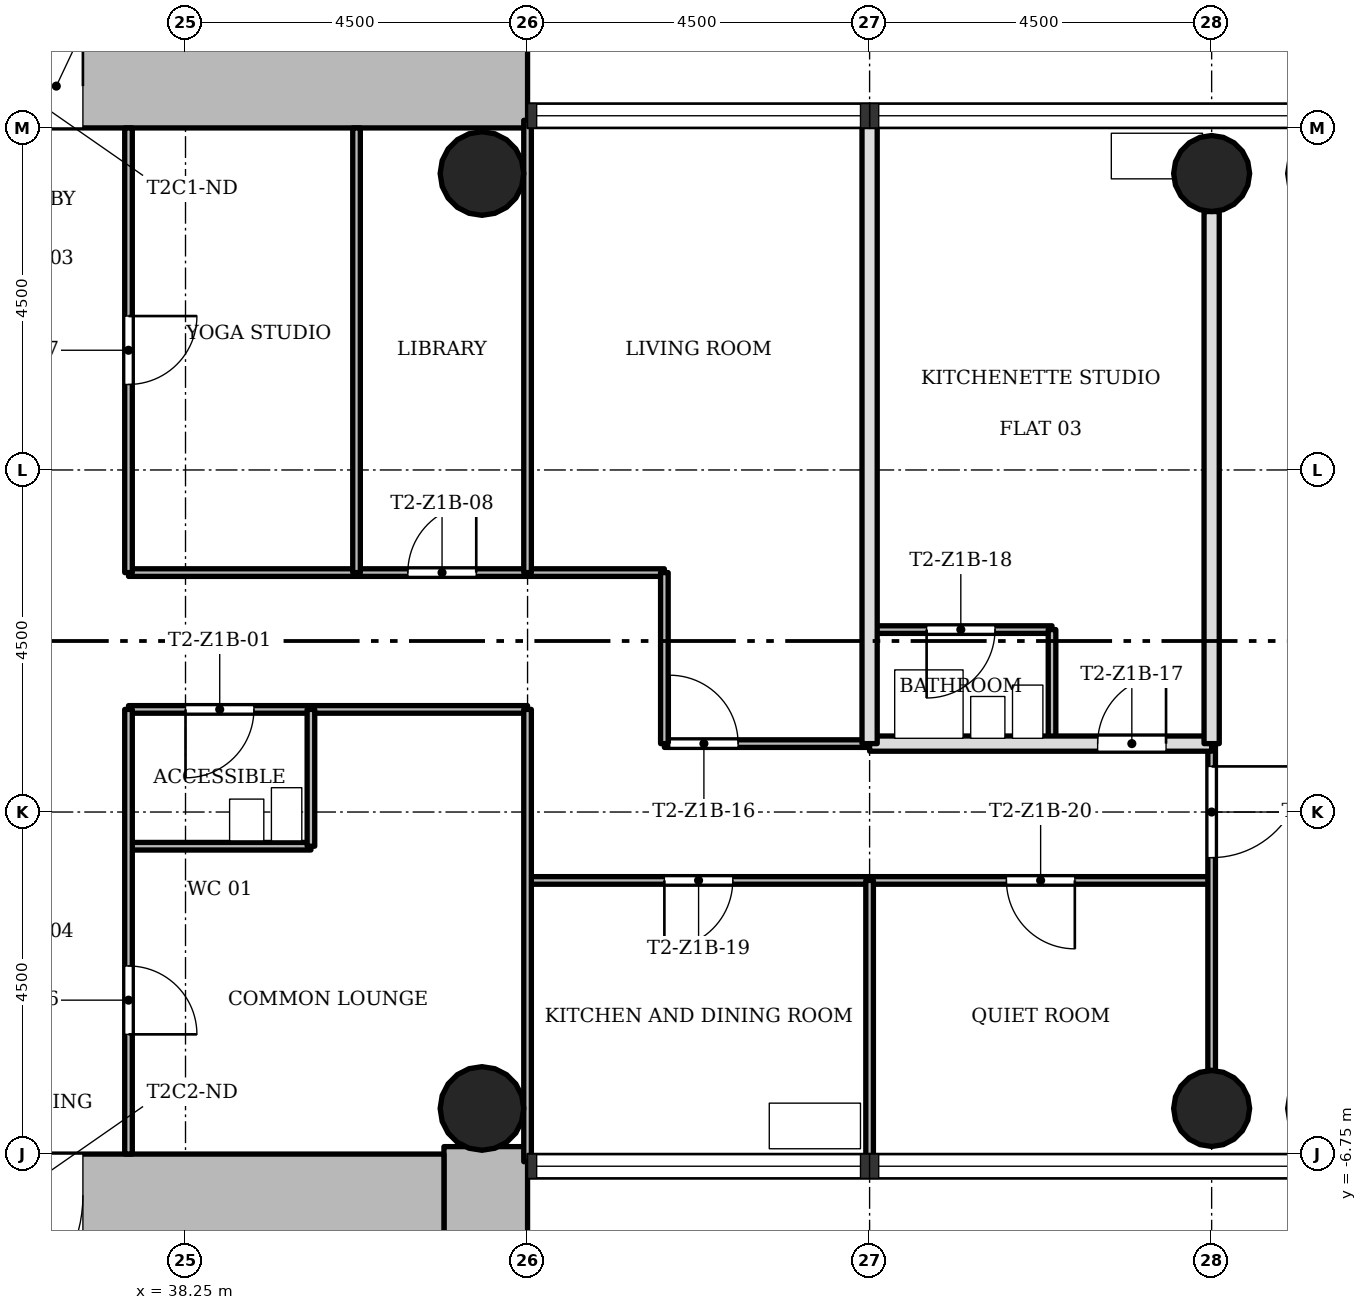
"""IFC4 building model, lengths in metres.
Left out: names, types, materials, properties, quantities, classifications, styles, units other than length and angle.
Written with IfcOpenShell. Run it as: python <this file> out.ifc"""

import sys

from ifc_helpers import new_model, si_unit, direction, frame, frame_2d, origin, origin_2d, place, context, subcontext, project, spatial, rectangle, hollow_circle, extrude, element, fill, save


model = new_model("IFC4")
c1 = context("Model", 3, precision=1e-05, world=origin(), true_north=direction((0.0, 1.0)))
c2 = subcontext(c1, "Body", "Model", "MODEL_VIEW")
j1 = project(units=[si_unit("LENGTHUNIT", "METRE"), si_unit("PLANEANGLEUNIT", "RADIAN")], contexts=[c1])
p1 = place(None, origin())
s1 = spatial("IfcSite", under=j1, at=p1, CompositionType="ELEMENT")
p2 = place(p1, origin())
s2 = spatial("IfcBuilding", under=s1, at=p2, CompositionType="ELEMENT")
p3 = place(p2, frame((0.0, 0.0, 34.7)))
s3 = spatial("IfcBuildingStorey", under=s2, at=p3, CompositionType="ELEMENT", Elevation=34.7)
p4 = place(p3, frame((30.35, 7.3, 0.0), z_axis=(0.0, 0.0, 1.0), x_axis=(1.0, 0.0, 0.0)))
e1 = element("IfcWall", 1, at=p4, inside=s3, PredefinedType="SHEAR", context=c2, shape_type="SweptSolid", body=[
    extrude(rectangle(XDim=12.4, YDim=1.1, at=frame_2d((6.2, 0.0))), origin(), (0.0, 0.0, 1.0), 3.4),
])
p5 = place(p4, frame((4.75, 0.0, 0.0)))
e2 = element("IfcOpeningElement", 2, at=p5, cuts=e1, PredefinedType="OPENING", context=c2, shape_type="SweptSolid", body=[
    extrude(rectangle(XDim=1.8, YDim=2.1, at=frame_2d((0.9, 1.05))), frame((0.0, 0.56, 0.0), z_axis=(0.0, -1.0, 0.0), x_axis=(1.0, 0.0, 0.0)), (0.0, 0.0, 1.0), 1.12),
])
p6 = place(p3, frame((42.2, -15.248, 0.0), z_axis=(0.0, 0.0, 1.0), x_axis=(0.0, 1.0, 0.0)))
e3 = element("IfcWall", 3, at=p6, inside=s3, PredefinedType="SHEAR", context=c2, shape_type="SweptSolid", body=[
    extrude(rectangle(XDim=8.596, YDim=1.1, at=frame_2d((4.298, 0.0))), origin(), (0.0, 0.0, 1.0), 3.4),
])
p7 = place(p3, frame((41.65, -7.3, 0.0), z_axis=(0.0, 0.0, 1.0), x_axis=(-1.0, 0.0, 0.0)))
e4 = element("IfcWall", 4, at=p7, inside=s3, PredefinedType="SHEAR", context=c2, shape_type="SweptSolid", body=[
    extrude(rectangle(XDim=12.4, YDim=1.1, at=frame_2d((6.2, 0.0))), origin(), (0.0, 0.0, 1.0), 3.4),
])
p8 = place(p7, frame((4.75, 0.0, 0.0)))
e5 = element("IfcOpeningElement", 5, at=p8, cuts=e4, PredefinedType="OPENING", context=c2, shape_type="SweptSolid", body=[
    extrude(rectangle(XDim=1.8, YDim=2.1, at=frame_2d((0.9, 1.05))), frame((0.0, 0.56, 0.0), z_axis=(0.0, -1.0, 0.0), x_axis=(1.0, 0.0, 0.0)), (0.0, 0.0, 1.0), 1.12),
])
for number, where, z_axis, x_axis in (
    (6, (51.75, -6.15, 0.0), (0.0, 0.0, 1.0), (1.0, 0.0, 0.0)),
    (7, (51.75, 6.15, 0.0), (0.0, 0.0, 1.0), (1.0, 0.0, 0.0)),
):
    element("IfcColumn", number, at=place(p3, frame(where, z_axis=z_axis, x_axis=x_axis)), inside=s3, PredefinedType="COLUMN", context=c2, shape_type="SweptSolid", body=[
        extrude(hollow_circle(Radius=0.5, WallThickness=0.036, at=origin_2d()), origin(), (0.0, 0.0, 1.0), 3.4),
    ])
for number, where, z_axis, x_axis in (
    (8, (42.15, -6.15, 0.0), (0.0, 0.0, 1.0), (1.0, 0.0, 0.0)),
    (9, (42.15, 6.15, 0.0), (0.0, 0.0, 1.0), (1.0, 0.0, 0.0)),
):
    element("IfcColumn", number, at=place(p3, frame(where, z_axis=z_axis, x_axis=x_axis)), inside=s3, PredefinedType="COLUMN", context=c2, shape_type="SweptSolid", body=[
        extrude(hollow_circle(Radius=0.55, WallThickness=0.04, at=origin_2d()), origin(), (0.0, 0.0, 1.0), 3.4),
    ])
p9 = place(p3, frame((51.75, -3.15, 0.0), z_axis=(0.0, 0.0, 1.0), x_axis=(-1.0, 0.0, 0.0)))
e10 = element("IfcWall", 10, at=p9, inside=s3, PredefinedType="PARTITIONING", context=c2, shape_type="SweptSolid", body=[
    extrude(rectangle(XDim=9.0, YDim=0.1, at=frame_2d((4.5, 0.0))), origin(), (0.0, 0.0, 1.0), 3.0),
])
p10 = place(p9, frame((6.3, 0.0, 0.0)))
e11 = element("IfcOpeningElement", 11, at=p10, cuts=e10, PredefinedType="OPENING", context=c2, shape_type="SweptSolid", body=[
    extrude(rectangle(XDim=0.9, YDim=2.1, at=frame_2d((0.45, 1.05))), frame((0.0, 0.06, 0.0), z_axis=(0.0, -1.0, 0.0), x_axis=(1.0, 0.0, 0.0)), (0.0, 0.0, 1.0), 0.12),
])
p11 = place(p9, frame((1.8, 0.0, 0.0)))
e12 = element("IfcOpeningElement", 12, at=p11, cuts=e10, PredefinedType="OPENING", context=c2, shape_type="SweptSolid", body=[
    extrude(rectangle(XDim=0.9, YDim=2.1, at=frame_2d((0.45, 1.05))), frame((0.0, 0.06, 0.0), z_axis=(0.0, -1.0, 0.0), x_axis=(1.0, 0.0, 0.0)), (0.0, 0.0, 1.0), 0.12),
])
p12 = place(p3, frame((39.9, -2.7, 0.0), z_axis=(0.0, 0.0, 1.0), x_axis=(-1.0, 0.0, 0.0)))
e13 = element("IfcWall", 13, at=p12, inside=s3, PredefinedType="PARTITIONING", context=c2, shape_type="SweptSolid", body=[
    extrude(rectangle(XDim=2.4, YDim=0.1, at=frame_2d((1.2, 0.0))), origin(), (0.0, 0.0, 1.0), 3.0),
])
p13 = place(p3, frame((47.25, -1.35, 0.0), z_axis=(0.0, 0.0, 1.0), x_axis=(-1.0, 0.0, 0.0)))
e14 = element("IfcWall", 14, at=p13, inside=s3, PredefinedType="PARTITIONING", context=c2, shape_type="SweptSolid", body=[
    extrude(rectangle(XDim=2.7, YDim=0.1, at=frame_2d((1.35, 0.0))), origin(), (0.0, 0.0, 1.0), 3.0),
])
p14 = place(p13, frame((1.73, 0.0, 0.0)))
e15 = element("IfcOpeningElement", 15, at=p14, cuts=e14, PredefinedType="OPENING", context=c2, shape_type="SweptSolid", body=[
    extrude(rectangle(XDim=0.9, YDim=2.1, at=frame_2d((0.45, 1.05))), frame((0.0, 0.06, 0.0), z_axis=(0.0, -1.0, 0.0), x_axis=(1.0, 0.0, 0.0)), (0.0, 0.0, 1.0), 0.12),
])
p15 = place(p3, frame((51.75, -1.35, 0.0), z_axis=(0.0, 0.0, 1.0), x_axis=(-1.0, 0.0, 0.0)))
e16 = element("IfcWall", 16, at=p15, inside=s3, PredefinedType="SOLIDWALL", context=c2, shape_type="SweptSolid", body=[
    extrude(rectangle(XDim=4.5, YDim=0.2, at=frame_2d((2.25, 0.0))), origin(), (0.0, 0.0, 1.0), 3.0),
])
p16 = place(p15, frame((0.6, 0.0, 0.0)))
e17 = element("IfcOpeningElement", 17, at=p16, cuts=e16, PredefinedType="OPENING", context=c2, shape_type="SweptSolid", body=[
    extrude(rectangle(XDim=0.9, YDim=2.1, at=frame_2d((0.45, 1.05))), frame((0.0, 0.11, 0.0), z_axis=(0.0, -1.0, 0.0), x_axis=(1.0, 0.0, 0.0)), (0.0, 0.0, 1.0), 0.22),
])
p17 = place(p3, frame((42.75, -0.9, 0.0), z_axis=(0.0, 0.0, 1.0), x_axis=(-1.0, 0.0, 0.0)))
e18 = element("IfcWall", 18, at=p17, inside=s3, PredefinedType="PARTITIONING", context=c2, shape_type="SweptSolid", body=[
    extrude(rectangle(XDim=5.25, YDim=0.1, at=frame_2d((2.625, 0.0))), origin(), (0.0, 0.0, 1.0), 3.0),
])
p18 = place(p17, frame((3.6, 0.0, 0.0)))
e19 = element("IfcOpeningElement", 19, at=p18, cuts=e18, PredefinedType="OPENING", context=c2, shape_type="SweptSolid", body=[
    extrude(rectangle(XDim=0.9, YDim=2.1, at=frame_2d((0.45, 1.05))), frame((0.0, 0.06, 0.0), z_axis=(0.0, -1.0, 0.0), x_axis=(1.0, 0.0, 0.0)), (0.0, 0.0, 1.0), 0.12),
])
p19 = place(p3, frame((49.65, 0.15, 0.0), z_axis=(0.0, 0.0, 1.0), x_axis=(-1.0, 0.0, 0.0)))
e20 = element("IfcWall", 20, at=p19, inside=s3, PredefinedType="PARTITIONING", context=c2, shape_type="SweptSolid", body=[
    extrude(rectangle(XDim=2.4, YDim=0.1, at=frame_2d((1.2, 0.0))), origin(), (0.0, 0.0, 1.0), 3.0),
])
p20 = place(p19, frame((0.75, 0.0, 0.0)))
e21 = element("IfcOpeningElement", 21, at=p20, cuts=e20, PredefinedType="OPENING", context=c2, shape_type="SweptSolid", body=[
    extrude(rectangle(XDim=0.9, YDim=2.1, at=frame_2d((0.45, 1.05))), frame((0.0, 0.06, 0.0), z_axis=(0.0, -1.0, 0.0), x_axis=(1.0, 0.0, 0.0)), (0.0, 0.0, 1.0), 0.12),
])
p21 = place(p3, frame((44.55, 0.9, 0.0), z_axis=(0.0, 0.0, 1.0), x_axis=(-1.0, 0.0, 0.0)))
e22 = element("IfcWall", 22, at=p21, inside=s3, PredefinedType="PARTITIONING", context=c2, shape_type="SweptSolid", body=[
    extrude(rectangle(XDim=7.05, YDim=0.1, at=frame_2d((3.525, 0.0))), origin(), (0.0, 0.0, 1.0), 3.0),
])
p22 = place(p21, frame((2.475, 0.0, 0.0)))
e23 = element("IfcOpeningElement", 23, at=p22, cuts=e22, PredefinedType="OPENING", context=c2, shape_type="SweptSolid", body=[
    extrude(rectangle(XDim=0.9, YDim=2.1, at=frame_2d((0.45, 1.05))), frame((0.0, 0.06, 0.0), z_axis=(0.0, -1.0, 0.0), x_axis=(1.0, 0.0, 0.0)), (0.0, 0.0, 1.0), 0.12),
])
p23 = place(p3, frame((51.75, -5.65, 0.0), z_axis=(0.0, 0.0, 1.0), x_axis=(0.0, 1.0, 0.0)))
e24 = element("IfcWall", 24, at=p23, inside=s3, PredefinedType="PARTITIONING", context=c2, shape_type="SweptSolid", body=[
    extrude(rectangle(XDim=4.3, YDim=0.1, at=frame_2d((2.15, 0.0))), origin(), (0.0, 0.0, 1.0), 3.0),
])
p24 = place(p23, frame((2.8, 0.0, 0.0)))
e25 = element("IfcOpeningElement", 25, at=p24, cuts=e24, PredefinedType="OPENING", context=c2, shape_type="SweptSolid", body=[
    extrude(rectangle(XDim=1.2, YDim=2.1, at=frame_2d((0.6, 1.05))), frame((0.0, 0.06, 0.0), z_axis=(0.0, -1.0, 0.0), x_axis=(1.0, 0.0, 0.0)), (0.0, 0.0, 1.0), 0.12),
])
p25 = place(p3, frame((51.75, -1.35, 0.0), z_axis=(0.0, 0.0, 1.0), x_axis=(0.0, 1.0, 0.0)))
e26 = element("IfcWall", 26, at=p25, inside=s3, PredefinedType="SOLIDWALL", context=c2, shape_type="SweptSolid", body=[
    extrude(rectangle(XDim=7.0, YDim=0.2, at=frame_2d((3.5, 0.0))), origin(), (0.0, 0.0, 1.0), 3.0),
])
p26 = place(p3, frame((49.65, -1.35, 0.0), z_axis=(0.0, 0.0, 1.0), x_axis=(0.0, 1.0, 0.0)))
e27 = element("IfcWall", 27, at=p26, inside=s3, PredefinedType="PARTITIONING", context=c2, shape_type="SweptSolid", body=[
    extrude(rectangle(XDim=1.5, YDim=0.1, at=frame_2d((0.75, 0.0))), origin(), (0.0, 0.0, 1.0), 3.0),
])
p27 = place(p3, frame((47.25, -6.85, 0.0), z_axis=(0.0, 0.0, 1.0), x_axis=(0.0, 1.0, 0.0)))
e28 = element("IfcWall", 28, at=p27, inside=s3, PredefinedType="PARTITIONING", context=c2, shape_type="SweptSolid", body=[
    extrude(rectangle(XDim=3.7, YDim=0.1, at=frame_2d((1.85, 0.0))), origin(), (0.0, 0.0, 1.0), 3.0),
])
p28 = place(p3, frame((47.25, -1.35, 0.0), z_axis=(0.0, 0.0, 1.0), x_axis=(0.0, 1.0, 0.0)))
e29 = element("IfcWall", 29, at=p28, inside=s3, PredefinedType="SOLIDWALL", context=c2, shape_type="SweptSolid", body=[
    extrude(rectangle(XDim=8.2, YDim=0.2, at=frame_2d((4.1, 0.0))), origin(), (0.0, 0.0, 1.0), 3.0),
])
p29 = place(p3, frame((44.55, -1.35, 0.0), z_axis=(0.0, 0.0, 1.0), x_axis=(0.0, 1.0, 0.0)))
e30 = element("IfcWall", 30, at=p29, inside=s3, PredefinedType="PARTITIONING", context=c2, shape_type="SweptSolid", body=[
    extrude(rectangle(XDim=2.25, YDim=0.1, at=frame_2d((1.125, 0.0))), origin(), (0.0, 0.0, 1.0), 3.0),
])
for number, where, z_axis, x_axis in (
    (31, (42.75, -6.85, 0.0), (0.0, 0.0, 1.0), (0.0, 1.0, 0.0)),
    (32, (42.75, 0.9, 0.0), (0.0, 0.0, 1.0), (0.0, 1.0, 0.0)),
):
    element("IfcWall", number, at=place(p3, frame(where, z_axis=z_axis, x_axis=x_axis)), inside=s3, PredefinedType="PARTITIONING", context=c2, shape_type="SweptSolid", body=[
        extrude(rectangle(XDim=5.95, YDim=0.1, at=frame_2d((2.975, 0.0))), origin(), (0.0, 0.0, 1.0), 3.0),
    ])
p30 = place(p3, frame((40.5, 0.9, 0.0), z_axis=(0.0, 0.0, 1.0), x_axis=(0.0, 1.0, 0.0)))
e33 = element("IfcWall", 33, at=p30, inside=s3, PredefinedType="PARTITIONING", context=c2, shape_type="SweptSolid", body=[
    extrude(rectangle(XDim=5.85, YDim=0.1, at=frame_2d((2.925, 0.0))), origin(), (0.0, 0.0, 1.0), 3.0),
])
p31 = place(p3, frame((39.9, -2.7, 0.0), z_axis=(0.0, 0.0, 1.0), x_axis=(0.0, 1.0, 0.0)))
e34 = element("IfcWall", 34, at=p31, inside=s3, PredefinedType="PARTITIONING", context=c2, shape_type="SweptSolid", body=[
    extrude(rectangle(XDim=1.8, YDim=0.1, at=frame_2d((0.9, 0.0))), origin(), (0.0, 0.0, 1.0), 3.0),
])
p32 = place(p3, frame((37.5, -6.75, 0.0), z_axis=(0.0, 0.0, 1.0), x_axis=(0.0, 1.0, 0.0)))
e35 = element("IfcWall", 35, at=p32, inside=s3, PredefinedType="PARTITIONING", context=c2, shape_type="SweptSolid", body=[
    extrude(rectangle(XDim=5.85, YDim=0.1, at=frame_2d((2.925, 0.0))), origin(), (0.0, 0.0, 1.0), 3.0),
])
p33 = place(p32, frame((1.575, 0.0, 0.0)))
e36 = element("IfcOpeningElement", 36, at=p33, cuts=e35, PredefinedType="OPENING", context=c2, shape_type="SweptSolid", body=[
    extrude(rectangle(XDim=0.9, YDim=2.1, at=frame_2d((0.45, 1.05))), frame((0.0, 0.06, 0.0), z_axis=(0.0, -1.0, 0.0), x_axis=(1.0, 0.0, 0.0)), (0.0, 0.0, 1.0), 0.12),
])
p34 = place(p3, frame((37.5, 0.9, 0.0), z_axis=(0.0, 0.0, 1.0), x_axis=(0.0, 1.0, 0.0)))
e37 = element("IfcWall", 37, at=p34, inside=s3, PredefinedType="PARTITIONING", context=c2, shape_type="SweptSolid", body=[
    extrude(rectangle(XDim=5.85, YDim=0.1, at=frame_2d((2.925, 0.0))), origin(), (0.0, 0.0, 1.0), 3.0),
])
p35 = place(p34, frame((2.475, 0.0, 0.0)))
e38 = element("IfcOpeningElement", 38, at=p35, cuts=e37, PredefinedType="OPENING", context=c2, shape_type="SweptSolid", body=[
    extrude(rectangle(XDim=0.9, YDim=2.1, at=frame_2d((0.45, 1.05))), frame((0.0, 0.06, 0.0), z_axis=(0.0, -1.0, 0.0), x_axis=(1.0, 0.0, 0.0)), (0.0, 0.0, 1.0), 0.12),
])
p36 = place(p18, origin())
e39 = element("IfcDoor", 39, at=p36, inside=s3, OperationType="SINGLE_SWING_LEFT", PredefinedType="DOOR", context=c2, shape_type="SweptSolid", body=[
    extrude(rectangle(XDim=0.9, YDim=2.1, at=frame_2d((0.45, 1.05))), frame((0.0, 0.025, 0.0), z_axis=(0.0, -1.0, 0.0), x_axis=(1.0, 0.0, 0.0)), (0.0, 0.0, 1.0), 0.05),
])
fill(e19, e39)
p37 = place(p33, origin())
e40 = element("IfcDoor", 40, at=p37, inside=s3, OperationType="SINGLE_SWING_LEFT", PredefinedType="DOOR", context=c2, shape_type="SweptSolid", body=[
    extrude(rectangle(XDim=0.9, YDim=2.1, at=frame_2d((0.45, 1.05))), frame((0.0, 0.025, 0.0), z_axis=(0.0, -1.0, 0.0), x_axis=(1.0, 0.0, 0.0)), (0.0, 0.0, 1.0), 0.05),
])
fill(e36, e40)
p38 = place(p35, origin())
e41 = element("IfcDoor", 41, at=p38, inside=s3, OperationType="SINGLE_SWING_RIGHT", PredefinedType="DOOR", context=c2, shape_type="SweptSolid", body=[
    extrude(rectangle(XDim=0.9, YDim=2.1, at=frame_2d((0.45, 1.05))), frame((0.0, 0.025, 0.0), z_axis=(0.0, -1.0, 0.0), x_axis=(1.0, 0.0, 0.0)), (0.0, 0.0, 1.0), 0.05),
])
fill(e38, e41)
p39 = place(p22, origin())
e42 = element("IfcDoor", 42, at=p39, inside=s3, OperationType="SINGLE_SWING_LEFT", PredefinedType="DOOR", context=c2, shape_type="SweptSolid", body=[
    extrude(rectangle(XDim=0.9, YDim=2.1, at=frame_2d((0.45, 1.05))), frame((0.0, 0.025, 0.0), z_axis=(0.0, -1.0, 0.0), x_axis=(1.0, 0.0, 0.0)), (0.0, 0.0, 1.0), 0.05),
])
fill(e23, e42)
p40 = place(p14, origin())
e43 = element("IfcDoor", 43, at=p40, inside=s3, OperationType="SINGLE_SWING_RIGHT", PredefinedType="DOOR", context=c2, shape_type="SweptSolid", body=[
    extrude(rectangle(XDim=0.9, YDim=2.1, at=frame_2d((0.45, 1.05))), frame((0.0, 0.025, 0.0), z_axis=(0.0, -1.0, 0.0), x_axis=(1.0, 0.0, 0.0)), (0.0, 0.0, 1.0), 0.05),
])
fill(e15, e43)
p41 = place(p16, origin())
e44 = element("IfcDoor", 44, at=p41, inside=s3, OperationType="SINGLE_SWING_LEFT", PredefinedType="DOOR", context=c2, shape_type="SweptSolid", body=[
    extrude(rectangle(XDim=0.9, YDim=2.1, at=frame_2d((0.45, 1.05))), frame((0.0, 0.025, 0.0), z_axis=(0.0, -1.0, 0.0), x_axis=(1.0, 0.0, 0.0)), (0.0, 0.0, 1.0), 0.05),
])
fill(e17, e44)
p42 = place(p20, origin())
e45 = element("IfcDoor", 45, at=p42, inside=s3, OperationType="SINGLE_SWING_LEFT", PredefinedType="DOOR", context=c2, shape_type="SweptSolid", body=[
    extrude(rectangle(XDim=0.9, YDim=2.1, at=frame_2d((0.45, 1.05))), frame((0.0, 0.025, 0.0), z_axis=(0.0, -1.0, 0.0), x_axis=(1.0, 0.0, 0.0)), (0.0, 0.0, 1.0), 0.05),
])
fill(e21, e45)
p43 = place(p10, origin())
e46 = element("IfcDoor", 46, at=p43, inside=s3, OperationType="SINGLE_SWING_LEFT", PredefinedType="DOOR", context=c2, shape_type="SweptSolid", body=[
    extrude(rectangle(XDim=0.9, YDim=2.1, at=frame_2d((0.45, 1.05))), frame((0.0, 0.025, 0.0), z_axis=(0.0, -1.0, 0.0), x_axis=(1.0, 0.0, 0.0)), (0.0, 0.0, 1.0), 0.05),
])
fill(e11, e46)
p44 = place(p11, origin())
e47 = element("IfcDoor", 47, at=p44, inside=s3, OperationType="SINGLE_SWING_RIGHT", PredefinedType="DOOR", context=c2, shape_type="SweptSolid", body=[
    extrude(rectangle(XDim=0.9, YDim=2.1, at=frame_2d((0.45, 1.05))), frame((0.0, 0.025, 0.0), z_axis=(0.0, -1.0, 0.0), x_axis=(1.0, 0.0, 0.0)), (0.0, 0.0, 1.0), 0.05),
])
fill(e12, e47)
p45 = place(p24, origin())
e48 = element("IfcDoor", 48, at=p45, inside=s3, OperationType="SINGLE_SWING_RIGHT", PredefinedType="DOOR", context=c2, shape_type="SweptSolid", body=[
    extrude(rectangle(XDim=1.2, YDim=2.1, at=frame_2d((0.6, 1.05))), frame((0.0, 0.025, 0.0), z_axis=(0.0, -1.0, 0.0), x_axis=(1.0, 0.0, 0.0)), (0.0, 0.0, 1.0), 0.05),
])
fill(e25, e48)
p46 = place(p5, origin())
e49 = element("IfcDoor", 49, at=p46, inside=s3, OperationType="SINGLE_SWING_LEFT", PredefinedType="DOOR", context=c2, shape_type="SweptSolid", body=[
    extrude(rectangle(XDim=1.8, YDim=2.1, at=frame_2d((0.9, 1.05))), frame((0.0, 0.025, 0.0), z_axis=(0.0, -1.0, 0.0), x_axis=(1.0, 0.0, 0.0)), (0.0, 0.0, 1.0), 0.05),
])
fill(e2, e49)
p47 = place(p8, origin())
e50 = element("IfcDoor", 50, at=p47, inside=s3, OperationType="SINGLE_SWING_LEFT", PredefinedType="DOOR", context=c2, shape_type="SweptSolid", body=[
    extrude(rectangle(XDim=1.8, YDim=2.1, at=frame_2d((0.9, 1.05))), frame((0.0, 0.025, 0.0), z_axis=(0.0, -1.0, 0.0), x_axis=(1.0, 0.0, 0.0)), (0.0, 0.0, 1.0), 0.05),
])
fill(e5, e50)
save(model, sys.argv[1])
